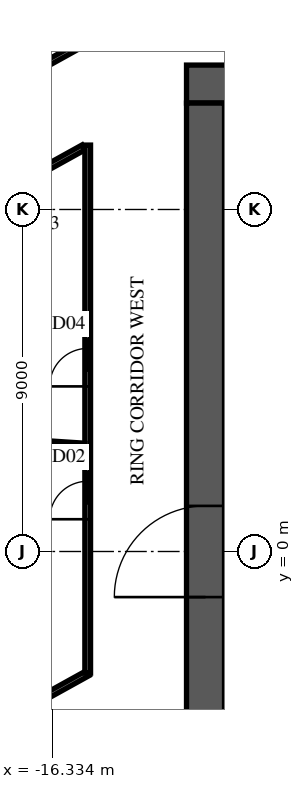
"""IFC4 building model, lengths in metres.
Left out: names, types, materials, properties, quantities, classifications, styles, units other than length and angle.
Written with IfcOpenShell. Run it as: python <this file> out.ifc"""

import sys

from ifc_helpers import new_model, si_unit, direction, frame, frame_2d, origin, place, context, subcontext, project, spatial, rectangle, extrude, element, fill, save


model = new_model("IFC4")
c1 = context("Model", 3, precision=1e-05, world=origin(), true_north=direction((0.0, 1.0)))
c2 = subcontext(c1, "Body", "Model", "MODEL_VIEW")
j1 = project(units=[si_unit("LENGTHUNIT", "METRE"), si_unit("PLANEANGLEUNIT", "RADIAN")], contexts=[c1])
p1 = place(None, origin())
s1 = spatial("IfcSite", under=j1, at=p1, CompositionType="ELEMENT")
p2 = place(p1, origin())
s2 = spatial("IfcBuilding", under=s1, at=p2, CompositionType="ELEMENT")
p3 = place(p2, frame((0.0, 0.0, 139.7)))
s3 = spatial("IfcBuildingStorey", under=s2, at=p3, CompositionType="ELEMENT", Elevation=139.7)
p4 = place(p3, frame((-12.8, 12.3, 0.0), z_axis=(0.0, 0.0, 1.0), x_axis=(1.0, 0.0, 0.0)))
e1 = element("IfcWall", 1, at=p4, inside=s3, PredefinedType="SHEAR", context=c2, shape_type="SweptSolid", body=[
    extrude(rectangle(XDim=25.6, YDim=1.0, at=frame_2d((12.8, 0.0))), origin(), (0.0, 0.0, 1.0), 3.6),
])
p5 = place(p4, frame((11.6, 0.0, 0.0)))
e2 = element("IfcOpeningElement", 2, at=p5, cuts=e1, PredefinedType="OPENING", context=c2, shape_type="SweptSolid", body=[
    extrude(rectangle(XDim=2.4, YDim=2.4, at=frame_2d((1.2, 1.2))), frame((0.0, 0.51, 0.0), z_axis=(0.0, -1.0, 0.0), x_axis=(1.0, 0.0, 0.0)), (0.0, 0.0, 1.0), 1.02),
])
p6 = place(p4, frame((22.425, 0.0, 0.0)))
e3 = element("IfcOpeningElement", 3, at=p6, cuts=e1, PredefinedType="OPENING", context=c2, shape_type="SweptSolid", body=[
    extrude(rectangle(XDim=1.2, YDim=2.1, at=frame_2d((0.6, 1.05))), frame((0.0, 0.51, 0.0), z_axis=(0.0, -1.0, 0.0), x_axis=(1.0, 0.0, 0.0)), (0.0, 0.0, 1.0), 1.02),
])
p7 = place(p4, frame((1.4, 0.0, 0.0)))
e4 = element("IfcOpeningElement", 4, at=p7, cuts=e1, PredefinedType="OPENING", context=c2, shape_type="SweptSolid", body=[
    extrude(rectangle(XDim=1.0, YDim=2.1, at=frame_2d((0.5, 1.05))), frame((0.0, 0.51, 0.0), z_axis=(0.0, -1.0, 0.0), x_axis=(1.0, 0.0, 0.0)), (0.0, 0.0, 1.0), 1.02),
])
p8 = place(p3, frame((-12.3, -11.8, 0.0), z_axis=(0.0, 0.0, 1.0), x_axis=(0.0, 1.0, 0.0)))
e5 = element("IfcWall", 5, at=p8, inside=s3, PredefinedType="SHEAR", context=c2, shape_type="SweptSolid", body=[
    extrude(rectangle(XDim=23.6, YDim=1.0, at=frame_2d((11.8, 0.0))), origin(), (0.0, 0.0, 1.0), 3.6),
])
p9 = place(p8, frame((10.6, 0.0, 0.0)))
e6 = element("IfcOpeningElement", 6, at=p9, cuts=e5, PredefinedType="OPENING", context=c2, shape_type="SweptSolid", body=[
    extrude(rectangle(XDim=2.4, YDim=2.4, at=frame_2d((1.2, 1.2))), frame((0.0, 0.51, 0.0), z_axis=(0.0, -1.0, 0.0), x_axis=(1.0, 0.0, 0.0)), (0.0, 0.0, 1.0), 1.02),
])
p10 = place(p3, frame((8.775, 34.705, 0.0), z_axis=(0.0, 0.0, 1.0), x_axis=(-0.874620778241, -0.484807687922, 0.0)))
e7 = element("IfcWall", 7, at=p10, inside=s3, PredefinedType="STANDARD", context=c2, shape_type="SweptSolid", body=[
    extrude(rectangle(XDim=49.376, YDim=0.6, at=frame_2d((24.688, 0.0))), origin(), (0.0, 0.0, 1.0), 3.6),
])
p11 = place(p10, frame((1.2, 0.0, 0.9)))
e8 = element("IfcOpeningElement", 8, at=p11, cuts=e7, PredefinedType="OPENING", context=c2, shape_type="SweptSolid", body=[
    extrude(rectangle(XDim=2.1, YDim=2.1, at=frame_2d((1.05, 1.05))), frame((0.0, 0.31, 0.0), z_axis=(0.0, -1.0, 0.0), x_axis=(1.0, 0.0, 0.0)), (0.0, 0.0, 1.0), 0.62),
])
p12 = place(p10, frame((5.7, 0.0, 0.9)))
e9 = element("IfcOpeningElement", 9, at=p12, cuts=e7, PredefinedType="OPENING", context=c2, shape_type="SweptSolid", body=[
    extrude(rectangle(XDim=2.1, YDim=2.1, at=frame_2d((1.05, 1.05))), frame((0.0, 0.31, 0.0), z_axis=(0.0, -1.0, 0.0), x_axis=(1.0, 0.0, 0.0)), (0.0, 0.0, 1.0), 0.62),
])
p13 = place(p10, frame((14.7, 0.0, 0.9)))
e10 = element("IfcOpeningElement", 10, at=p13, cuts=e7, PredefinedType="OPENING", context=c2, shape_type="SweptSolid", body=[
    extrude(rectangle(XDim=2.1, YDim=2.1, at=frame_2d((1.05, 1.05))), frame((0.0, 0.31, 0.0), z_axis=(0.0, -1.0, 0.0), x_axis=(1.0, 0.0, 0.0)), (0.0, 0.0, 1.0), 0.62),
])
p14 = place(p10, frame((19.2, 0.0, 0.9)))
e11 = element("IfcOpeningElement", 11, at=p14, cuts=e7, PredefinedType="OPENING", context=c2, shape_type="SweptSolid", body=[
    extrude(rectangle(XDim=2.1, YDim=2.1, at=frame_2d((1.05, 1.05))), frame((0.0, 0.31, 0.0), z_axis=(0.0, -1.0, 0.0), x_axis=(1.0, 0.0, 0.0)), (0.0, 0.0, 1.0), 0.62),
])
p15 = place(p10, frame((23.7, 0.0, 0.9)))
e12 = element("IfcOpeningElement", 12, at=p15, cuts=e7, PredefinedType="OPENING", context=c2, shape_type="SweptSolid", body=[
    extrude(rectangle(XDim=2.1, YDim=2.1, at=frame_2d((1.05, 1.05))), frame((0.0, 0.31, 0.0), z_axis=(0.0, -1.0, 0.0), x_axis=(1.0, 0.0, 0.0)), (0.0, 0.0, 1.0), 0.62),
])
p16 = place(p10, frame((28.2, 0.0, 0.9)))
e13 = element("IfcOpeningElement", 13, at=p16, cuts=e7, PredefinedType="OPENING", context=c2, shape_type="SweptSolid", body=[
    extrude(rectangle(XDim=2.1, YDim=2.1, at=frame_2d((1.05, 1.05))), frame((0.0, 0.31, 0.0), z_axis=(0.0, -1.0, 0.0), x_axis=(1.0, 0.0, 0.0)), (0.0, 0.0, 1.0), 0.62),
])
p17 = place(p10, frame((32.7, 0.0, 0.9)))
e14 = element("IfcOpeningElement", 14, at=p17, cuts=e7, PredefinedType="OPENING", context=c2, shape_type="SweptSolid", body=[
    extrude(rectangle(XDim=2.1, YDim=2.1, at=frame_2d((1.05, 1.05))), frame((0.0, 0.31, 0.0), z_axis=(0.0, -1.0, 0.0), x_axis=(1.0, 0.0, 0.0)), (0.0, 0.0, 1.0), 0.62),
])
p18 = place(p10, frame((37.2, 0.0, 0.9)))
e15 = element("IfcOpeningElement", 15, at=p18, cuts=e7, PredefinedType="OPENING", context=c2, shape_type="SweptSolid", body=[
    extrude(rectangle(XDim=2.1, YDim=2.1, at=frame_2d((1.05, 1.05))), frame((0.0, 0.31, 0.0), z_axis=(0.0, -1.0, 0.0), x_axis=(1.0, 0.0, 0.0)), (0.0, 0.0, 1.0), 0.62),
])
p19 = place(p10, frame((41.7, 0.0, 0.9)))
e16 = element("IfcOpeningElement", 16, at=p19, cuts=e7, PredefinedType="OPENING", context=c2, shape_type="SweptSolid", body=[
    extrude(rectangle(XDim=2.1, YDim=2.1, at=frame_2d((1.05, 1.05))), frame((0.0, 0.31, 0.0), z_axis=(0.0, -1.0, 0.0), x_axis=(1.0, 0.0, 0.0)), (0.0, 0.0, 1.0), 0.62),
])
p20 = place(p10, frame((46.138, 0.0, 0.9)))
e17 = element("IfcOpeningElement", 17, at=p20, cuts=e7, PredefinedType="OPENING", context=c2, shape_type="SweptSolid", body=[
    extrude(rectangle(XDim=2.1, YDim=2.1, at=frame_2d((1.05, 1.05))), frame((0.0, 0.31, 0.0), z_axis=(0.0, -1.0, 0.0), x_axis=(1.0, 0.0, 0.0)), (0.0, 0.0, 1.0), 0.62),
])
p21 = place(p3, frame((-36.291, 4.209, 0.0), z_axis=(0.0, 0.0, 1.0), x_axis=(0.484810659622, -0.874619131003, 0.0)))
e18 = element("IfcWall", 18, at=p21, inside=s3, PredefinedType="STANDARD", context=c2, shape_type="SweptSolid", body=[
    extrude(rectangle(XDim=42.552, YDim=0.6, at=frame_2d((21.276, 0.0))), origin(), (0.0, 0.0, 1.0), 3.6),
])
p22 = place(p21, frame((1.178, 0.0, 0.9)))
e19 = element("IfcOpeningElement", 19, at=p22, cuts=e18, PredefinedType="OPENING", context=c2, shape_type="SweptSolid", body=[
    extrude(rectangle(XDim=1.8, YDim=2.1, at=frame_2d((0.9, 1.05))), frame((0.0, 0.31, 0.0), z_axis=(0.0, -1.0, 0.0), x_axis=(1.0, 0.0, 0.0)), (0.0, 0.0, 1.0), 0.62),
])
p23 = place(p21, frame((5.396, 0.0, 0.9)))
e20 = element("IfcOpeningElement", 20, at=p23, cuts=e18, PredefinedType="OPENING", context=c2, shape_type="SweptSolid", body=[
    extrude(rectangle(XDim=1.8, YDim=2.1, at=frame_2d((0.9, 1.05))), frame((0.0, 0.31, 0.0), z_axis=(0.0, -1.0, 0.0), x_axis=(1.0, 0.0, 0.0)), (0.0, 0.0, 1.0), 0.62),
])
p24 = place(p21, frame((13.956, 0.0, 0.9)))
e21 = element("IfcOpeningElement", 21, at=p24, cuts=e18, PredefinedType="OPENING", context=c2, shape_type="SweptSolid", body=[
    extrude(rectangle(XDim=1.8, YDim=2.1, at=frame_2d((0.9, 1.05))), frame((0.0, 0.31, 0.0), z_axis=(0.0, -1.0, 0.0), x_axis=(1.0, 0.0, 0.0)), (0.0, 0.0, 1.0), 0.62),
])
p25 = place(p21, frame((18.236, 0.0, 0.9)))
e22 = element("IfcOpeningElement", 22, at=p25, cuts=e18, PredefinedType="OPENING", context=c2, shape_type="SweptSolid", body=[
    extrude(rectangle(XDim=1.8, YDim=2.1, at=frame_2d((0.9, 1.05))), frame((0.0, 0.31, 0.0), z_axis=(0.0, -1.0, 0.0), x_axis=(1.0, 0.0, 0.0)), (0.0, 0.0, 1.0), 0.62),
])
p26 = place(p21, frame((22.516, 0.0, 0.9)))
e23 = element("IfcOpeningElement", 23, at=p26, cuts=e18, PredefinedType="OPENING", context=c2, shape_type="SweptSolid", body=[
    extrude(rectangle(XDim=1.8, YDim=2.1, at=frame_2d((0.9, 1.05))), frame((0.0, 0.31, 0.0), z_axis=(0.0, -1.0, 0.0), x_axis=(1.0, 0.0, 0.0)), (0.0, 0.0, 1.0), 0.62),
])
p27 = place(p21, frame((26.796, 0.0, 0.9)))
e24 = element("IfcOpeningElement", 24, at=p27, cuts=e18, PredefinedType="OPENING", context=c2, shape_type="SweptSolid", body=[
    extrude(rectangle(XDim=1.8, YDim=2.1, at=frame_2d((0.9, 1.05))), frame((0.0, 0.31, 0.0), z_axis=(0.0, -1.0, 0.0), x_axis=(1.0, 0.0, 0.0)), (0.0, 0.0, 1.0), 0.62),
])
p28 = place(p21, frame((31.076, 0.0, 0.9)))
e25 = element("IfcOpeningElement", 25, at=p28, cuts=e18, PredefinedType="OPENING", context=c2, shape_type="SweptSolid", body=[
    extrude(rectangle(XDim=1.8, YDim=2.1, at=frame_2d((0.9, 1.05))), frame((0.0, 0.31, 0.0), z_axis=(0.0, -1.0, 0.0), x_axis=(1.0, 0.0, 0.0)), (0.0, 0.0, 1.0), 0.62),
])
p29 = place(p21, frame((35.356, 0.0, 0.9)))
e26 = element("IfcOpeningElement", 26, at=p29, cuts=e18, PredefinedType="OPENING", context=c2, shape_type="SweptSolid", body=[
    extrude(rectangle(XDim=1.8, YDim=2.1, at=frame_2d((0.9, 1.05))), frame((0.0, 0.31, 0.0), z_axis=(0.0, -1.0, 0.0), x_axis=(1.0, 0.0, 0.0)), (0.0, 0.0, 1.0), 0.62),
])
p30 = place(p21, frame((39.573, 0.0, 0.9)))
e27 = element("IfcOpeningElement", 27, at=p30, cuts=e18, PredefinedType="OPENING", context=c2, shape_type="SweptSolid", body=[
    extrude(rectangle(XDim=1.8, YDim=2.1, at=frame_2d((0.9, 1.05))), frame((0.0, 0.31, 0.0), z_axis=(0.0, -1.0, 0.0), x_axis=(1.0, 0.0, 0.0)), (0.0, 0.0, 1.0), 0.62),
])
p31 = place(p3, frame((-25.279, -1.467, 0.0), z_axis=(0.0, 0.0, 1.0), x_axis=(0.484803020703, -0.874623365294, 0.0)))
e28 = element("IfcWall", 28, at=p31, inside=s3, PredefinedType="PARTITIONING", context=c2, shape_type="SweptSolid", body=[
    extrude(rectangle(XDim=22.02, YDim=0.15, at=frame_2d((11.01, 0.0))), origin(), (0.0, 0.0, 1.0), 3.15),
])
p32 = place(p31, frame((6.3, 0.0, 0.0)))
e29 = element("IfcOpeningElement", 29, at=p32, cuts=e28, PredefinedType="OPENING", context=c2, shape_type="SweptSolid", body=[
    extrude(rectangle(XDim=1.8, YDim=2.1, at=frame_2d((0.9, 1.05))), frame((0.0, 0.085, 0.0), z_axis=(0.0, -1.0, 0.0), x_axis=(1.0, 0.0, 0.0)), (0.0, 0.0, 1.0), 0.17),
])
p33 = place(p31, frame((9.948, 0.0, 0.0)))
e30 = element("IfcOpeningElement", 30, at=p33, cuts=e28, PredefinedType="OPENING", context=c2, shape_type="SweptSolid", body=[
    extrude(rectangle(XDim=1.8, YDim=2.1, at=frame_2d((0.9, 1.05))), frame((0.0, 0.085, 0.0), z_axis=(0.0, -1.0, 0.0), x_axis=(1.0, 0.0, 0.0)), (0.0, 0.0, 1.0), 0.17),
])
p34 = place(p31, frame((20.448, 0.0, 0.0)))
e31 = element("IfcOpeningElement", 31, at=p34, cuts=e28, PredefinedType="OPENING", context=c2, shape_type="SweptSolid", body=[
    extrude(rectangle(XDim=1.0, YDim=2.1, at=frame_2d((0.5, 1.05))), frame((0.0, 0.085, 0.0), z_axis=(0.0, -1.0, 0.0), x_axis=(1.0, 0.0, 0.0)), (0.0, 0.0, 1.0), 0.17),
])
p35 = place(p3, frame((-23.187, 9.123, 0.0), z_axis=(0.0, 0.0, 1.0), x_axis=(0.874618419846, 0.484811942578, 0.0)))
e32 = element("IfcWall", 32, at=p35, inside=s3, PredefinedType="PARTITIONING", context=c2, shape_type="SweptSolid", body=[
    extrude(rectangle(XDim=31.713, YDim=0.15, at=frame_2d((15.857, 0.0))), origin(), (0.0, 0.0, 1.0), 3.15),
])
p36 = place(p35, frame((11.252, 0.0, 0.0)))
e33 = element("IfcOpeningElement", 33, at=p36, cuts=e32, PredefinedType="OPENING", context=c2, shape_type="SweptSolid", body=[
    extrude(rectangle(XDim=1.0, YDim=2.1, at=frame_2d((0.5, 1.05))), frame((0.0, 0.085, 0.0), z_axis=(0.0, -1.0, 0.0), x_axis=(1.0, 0.0, 0.0)), (0.0, 0.0, 1.0), 0.17),
])
p37 = place(p35, frame((19.896, 0.0, 0.0)))
e34 = element("IfcOpeningElement", 34, at=p37, cuts=e32, PredefinedType="OPENING", context=c2, shape_type="SweptSolid", body=[
    extrude(rectangle(XDim=1.0, YDim=2.1, at=frame_2d((0.5, 1.05))), frame((0.0, 0.085, 0.0), z_axis=(0.0, -1.0, 0.0), x_axis=(1.0, 0.0, 0.0)), (0.0, 0.0, 1.0), 0.17),
])
p38 = place(p35, frame((29.223, 0.0, 0.0)))
e35 = element("IfcOpeningElement", 35, at=p38, cuts=e32, PredefinedType="OPENING", context=c2, shape_type="SweptSolid", body=[
    extrude(rectangle(XDim=1.0, YDim=2.1, at=frame_2d((0.5, 1.05))), frame((0.0, 0.085, 0.0), z_axis=(0.0, -1.0, 0.0), x_axis=(1.0, 0.0, 0.0)), (0.0, 0.0, 1.0), 0.17),
])
p39 = place(p3, frame((-21.958, 7.06, 0.0), z_axis=(0.0, 0.0, 1.0), x_axis=(0.87462563297, 0.484798929611, 0.0)))
e36 = element("IfcWall", 36, at=p39, inside=s3, PredefinedType="PARTITIONING", context=c2, shape_type="SweptSolid", body=[
    extrude(rectangle(XDim=7.37, YDim=0.15, at=frame_2d((3.685, 0.0))), origin(), (0.0, 0.0, 1.0), 3.15),
])
p40 = place(p39, frame((4.55, 0.0, 0.0)))
e37 = element("IfcOpeningElement", 37, at=p40, cuts=e36, PredefinedType="OPENING", context=c2, shape_type="SweptSolid", body=[
    extrude(rectangle(XDim=1.8, YDim=2.1, at=frame_2d((0.9, 1.05))), frame((0.0, 0.085, 0.0), z_axis=(0.0, -1.0, 0.0), x_axis=(1.0, 0.0, 0.0)), (0.0, 0.0, 1.0), 0.17),
])
p41 = place(p3, frame((-20.056, -5.783, 0.0), z_axis=(0.0, 0.0, 1.0), x_axis=(0.874645694613, 0.484762734638, 0.0)))
e38 = element("IfcWall", 38, at=p41, inside=s3, PredefinedType="PARTITIONING", context=c2, shape_type="SweptSolid", body=[
    extrude(rectangle(XDim=5.324, YDim=0.15, at=frame_2d((2.662, 0.0))), origin(), (0.0, 0.0, 1.0), 3.15),
])
p42 = place(p3, frame((-15.4, -3.201, 0.0), z_axis=(0.0, 0.0, 1.0), x_axis=(0.0, 1.0, 0.0)))
e39 = element("IfcWall", 39, at=p42, inside=s3, PredefinedType="PARTITIONING", context=c2, shape_type="SweptSolid", body=[
    extrude(rectangle(XDim=13.896, YDim=0.15, at=frame_2d((6.948, 0.0))), origin(), (0.0, 0.0, 1.0), 3.15),
])
p43 = place(p42, frame((4.05, 0.0, 0.0)))
e40 = element("IfcOpeningElement", 40, at=p43, cuts=e39, PredefinedType="OPENING", context=c2, shape_type="SweptSolid", body=[
    extrude(rectangle(XDim=1.0, YDim=2.1, at=frame_2d((0.5, 1.05))), frame((0.0, 0.085, 0.0), z_axis=(0.0, -1.0, 0.0), x_axis=(1.0, 0.0, 0.0)), (0.0, 0.0, 1.0), 0.17),
])
p44 = place(p42, frame((7.546, 0.0, 0.0)))
e41 = element("IfcOpeningElement", 41, at=p44, cuts=e39, PredefinedType="OPENING", context=c2, shape_type="SweptSolid", body=[
    extrude(rectangle(XDim=1.0, YDim=2.1, at=frame_2d((0.5, 1.05))), frame((0.0, 0.085, 0.0), z_axis=(0.0, -1.0, 0.0), x_axis=(1.0, 0.0, 0.0)), (0.0, 0.0, 1.0), 0.17),
])
p45 = place(p3, frame((-29.831, 3.732, 0.0), z_axis=(0.0, 0.0, 1.0), x_axis=(0.997896608912, -0.0648255962, 0.0)))
e42 = element("IfcWall", 42, at=p45, inside=s3, PredefinedType="PARTITIONING", context=c2, shape_type="SweptSolid", body=[
    extrude(rectangle(XDim=14.383, YDim=0.1, at=frame_2d((7.191, 0.0))), origin(), (0.0, 0.0, 1.0), 3.03),
])
p46 = place(p9, origin())
e43 = element("IfcDoor", 43, at=p46, inside=s3, OperationType="SINGLE_SWING_LEFT", PredefinedType="DOOR", context=c2, shape_type="SweptSolid", body=[
    extrude(rectangle(XDim=2.4, YDim=2.4, at=frame_2d((1.2, 1.2))), frame((0.0, 0.025, 0.0), z_axis=(0.0, -1.0, 0.0), x_axis=(1.0, 0.0, 0.0)), (0.0, 0.0, 1.0), 0.05),
])
fill(e6, e43)
p47 = place(p43, origin())
e44 = element("IfcDoor", 44, at=p47, inside=s3, OperationType="SINGLE_SWING_RIGHT", PredefinedType="DOOR", context=c2, shape_type="SweptSolid", body=[
    extrude(rectangle(XDim=1.0, YDim=2.1, at=frame_2d((0.5, 1.05))), frame((0.0, 0.025, 0.0), z_axis=(0.0, -1.0, 0.0), x_axis=(1.0, 0.0, 0.0)), (0.0, 0.0, 1.0), 0.05),
])
fill(e40, e44)
p48 = place(p44, origin())
e45 = element("IfcDoor", 45, at=p48, inside=s3, OperationType="SINGLE_SWING_RIGHT", PredefinedType="DOOR", context=c2, shape_type="SweptSolid", body=[
    extrude(rectangle(XDim=1.0, YDim=2.1, at=frame_2d((0.5, 1.05))), frame((0.0, 0.025, 0.0), z_axis=(0.0, -1.0, 0.0), x_axis=(1.0, 0.0, 0.0)), (0.0, 0.0, 1.0), 0.05),
])
fill(e41, e45)
save(model, sys.argv[1])
